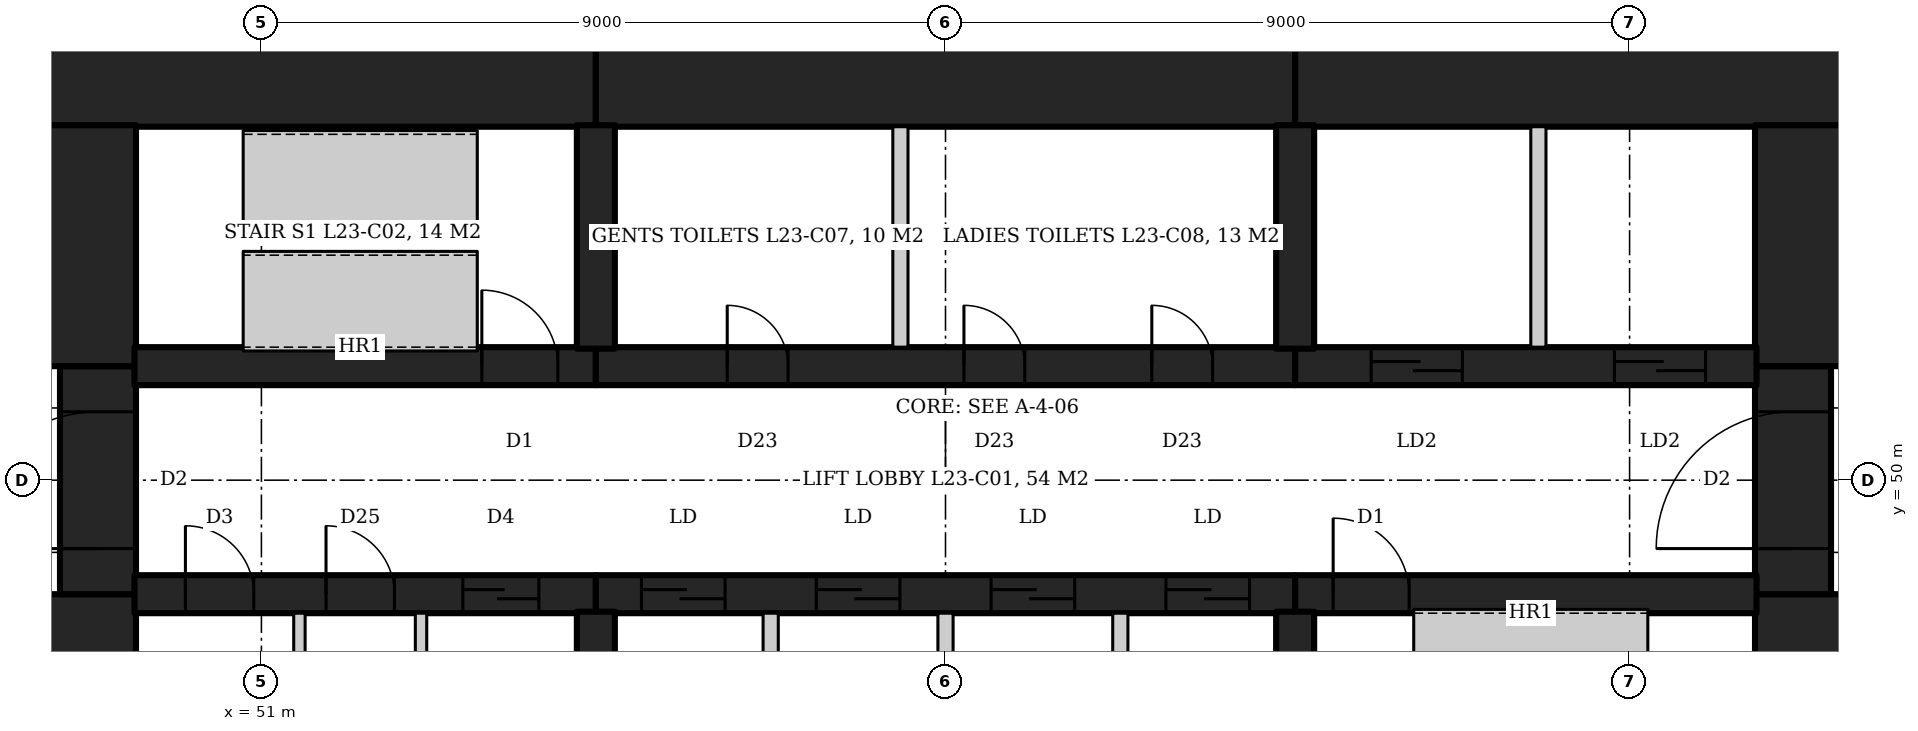
"""IFC4 building model, lengths in metres.
Left out: names, types, materials, properties, quantities, classifications, styles, units other than length and angle.
Written with IfcOpenShell. Run it as: python <this file> out.ifc"""

import sys

from ifc_helpers import new_model, si_unit, direction, frame, frame_2d, origin, place, context, subcontext, project, spatial, rectangle, extrude, element, fill, save


model = new_model("IFC4")
c1 = context("Model", 3, precision=1e-05, world=origin(), true_north=direction((0.0, 1.0)))
c2 = subcontext(c1, "Body", "Model", "MODEL_VIEW")
j1 = project(units=[si_unit("LENGTHUNIT", "METRE"), si_unit("PLANEANGLEUNIT", "RADIAN")], contexts=[c1])
p1 = place(None, origin())
s1 = spatial("IfcSite", under=j1, at=p1, CompositionType="ELEMENT")
p2 = place(p1, origin())
s2 = spatial("IfcBuilding", under=s1, at=p2, CompositionType="ELEMENT")
p3 = place(p2, frame((0.0, 0.0, 105.8)))
s3 = spatial("IfcBuildingStorey", under=s2, at=p3, CompositionType="ELEMENT", Elevation=105.8)
p4 = place(p3, frame((47.55, 55.55, 0.0), z_axis=(0.0, 0.0, 1.0), x_axis=(1.0, 0.0, 0.0)))
e1 = element("IfcWall", 1, at=p4, inside=s3, PredefinedType="SHEAR", context=c2, shape_type="SweptSolid", body=[
    extrude(rectangle(XDim=7.85, YDim=1.8, at=frame_2d((3.925, 0.0))), origin(), (0.0, 0.0, 1.0), 4.2),
])
p5 = place(p3, frame((55.4, 55.55, 0.0), z_axis=(0.0, 0.0, 1.0), x_axis=(1.0, 0.0, 0.0)))
e2 = element("IfcWall", 2, at=p5, inside=s3, PredefinedType="SHEAR", context=c2, shape_type="SweptSolid", body=[
    extrude(rectangle(XDim=9.2, YDim=1.8, at=frame_2d((4.6, 0.0))), origin(), (0.0, 0.0, 1.0), 4.2),
])
p6 = place(p3, frame((64.6, 55.55, 0.0), z_axis=(0.0, 0.0, 1.0), x_axis=(1.0, 0.0, 0.0)))
e3 = element("IfcWall", 3, at=p6, inside=s3, PredefinedType="SHEAR", context=c2, shape_type="SweptSolid", body=[
    extrude(rectangle(XDim=7.85, YDim=1.8, at=frame_2d((3.925, 0.0))), origin(), (0.0, 0.0, 1.0), 4.2),
])
p7 = place(p3, frame((71.55, 45.33, 0.0), z_axis=(0.0, 0.0, 1.0), x_axis=(0.0, 1.0, 0.0)))
e4 = element("IfcWall", 4, at=p7, inside=s3, PredefinedType="SHEAR", context=c2, shape_type="SweptSolid", body=[
    extrude(rectangle(XDim=3.17, YDim=1.8, at=frame_2d((1.585, 0.0))), origin(), (0.0, 0.0, 1.0), 4.2),
])
p8 = place(p3, frame((71.15, 48.5, 0.0), z_axis=(0.0, 0.0, 1.0), x_axis=(0.0, 1.0, 0.0)))
e5 = element("IfcWall", 5, at=p8, inside=s3, PredefinedType="SHEAR", context=c2, shape_type="SweptSolid", body=[
    extrude(rectangle(XDim=3.0, YDim=1.0, at=frame_2d((1.5, 0.0))), origin(), (0.0, 0.0, 1.0), 4.2),
])
p9 = place(p8, frame((0.6, 0.0, 0.0)))
e6 = element("IfcOpeningElement", 6, at=p9, cuts=e5, PredefinedType="OPENING", context=c2, shape_type="SweptSolid", body=[
    extrude(rectangle(XDim=1.8, YDim=2.1, at=frame_2d((0.9, 1.05))), frame((0.0, 0.51, 0.0), z_axis=(0.0, -1.0, 0.0), x_axis=(1.0, 0.0, 0.0)), (0.0, 0.0, 1.0), 1.02),
])
for number, where, z_axis, x_axis in (
    (7, (71.55, 51.5, 0.0), (0.0, 0.0, 1.0), (0.0, 1.0, 0.0)),
    (8, (48.45, 45.33, 0.0), (0.0, 0.0, 1.0), (0.0, 1.0, 0.0)),
):
    element("IfcWall", number, at=place(p3, frame(where, z_axis=z_axis, x_axis=x_axis)), inside=s3, PredefinedType="SHEAR", context=c2, shape_type="SweptSolid", body=[
        extrude(rectangle(XDim=3.17, YDim=1.8, at=frame_2d((1.585, 0.0))), origin(), (0.0, 0.0, 1.0), 4.2),
    ])
p10 = place(p3, frame((48.85, 48.5, 0.0), z_axis=(0.0, 0.0, 1.0), x_axis=(0.0, 1.0, 0.0)))
e9 = element("IfcWall", 9, at=p10, inside=s3, PredefinedType="SHEAR", context=c2, shape_type="SweptSolid", body=[
    extrude(rectangle(XDim=3.0, YDim=1.0, at=frame_2d((1.5, 0.0))), origin(), (0.0, 0.0, 1.0), 4.2),
])
p11 = place(p10, frame((0.6, 0.0, 0.0)))
e10 = element("IfcOpeningElement", 10, at=p11, cuts=e9, PredefinedType="OPENING", context=c2, shape_type="SweptSolid", body=[
    extrude(rectangle(XDim=1.8, YDim=2.1, at=frame_2d((0.9, 1.05))), frame((0.0, 0.51, 0.0), z_axis=(0.0, -1.0, 0.0), x_axis=(1.0, 0.0, 0.0)), (0.0, 0.0, 1.0), 1.02),
])
p12 = place(p3, frame((48.45, 51.5, 0.0), z_axis=(0.0, 0.0, 1.0), x_axis=(0.0, 1.0, 0.0)))
e11 = element("IfcWall", 11, at=p12, inside=s3, PredefinedType="SHEAR", context=c2, shape_type="SweptSolid", body=[
    extrude(rectangle(XDim=3.17, YDim=1.8, at=frame_2d((1.585, 0.0))), origin(), (0.0, 0.0, 1.0), 4.2),
])
p13 = place(p3, frame((49.33, 51.5, 0.0), z_axis=(0.0, 0.0, 1.0), x_axis=(1.0, 0.0, 0.0)))
e12 = element("IfcWall", 12, at=p13, inside=s3, PredefinedType="SHEAR", context=c2, shape_type="SweptSolid", body=[
    extrude(rectangle(XDim=6.07, YDim=0.5, at=frame_2d((3.035, 0.0))), origin(), (0.0, 0.0, 1.0), 4.2),
])
p14 = place(p13, frame((4.57, 0.0, 0.0)))
e13 = element("IfcOpeningElement", 13, at=p14, cuts=e12, PredefinedType="OPENING", context=c2, shape_type="SweptSolid", body=[
    extrude(rectangle(XDim=1.0, YDim=2.1, at=frame_2d((0.5, 1.05))), frame((0.0, 0.26, 0.0), z_axis=(0.0, -1.0, 0.0), x_axis=(1.0, 0.0, 0.0)), (0.0, 0.0, 1.0), 0.52),
])
p15 = place(p3, frame((55.4, 51.5, 0.0), z_axis=(0.0, 0.0, 1.0), x_axis=(1.0, 0.0, 0.0)))
e14 = element("IfcWall", 14, at=p15, inside=s3, PredefinedType="SHEAR", context=c2, shape_type="SweptSolid", body=[
    extrude(rectangle(XDim=9.2, YDim=0.5, at=frame_2d((4.6, 0.0))), origin(), (0.0, 0.0, 1.0), 4.2),
])
p16 = place(p15, frame((1.729, 0.0, 0.0)))
e15 = element("IfcOpeningElement", 15, at=p16, cuts=e14, PredefinedType="OPENING", context=c2, shape_type="SweptSolid", body=[
    extrude(rectangle(XDim=0.8, YDim=2.1, at=frame_2d((0.4, 1.05))), frame((0.0, 0.26, 0.0), z_axis=(0.0, -1.0, 0.0), x_axis=(1.0, 0.0, 0.0)), (0.0, 0.0, 1.0), 0.52),
])
p17 = place(p15, frame((4.843, 0.0, 0.0)))
e16 = element("IfcOpeningElement", 16, at=p17, cuts=e14, PredefinedType="OPENING", context=c2, shape_type="SweptSolid", body=[
    extrude(rectangle(XDim=0.8, YDim=2.1, at=frame_2d((0.4, 1.05))), frame((0.0, 0.26, 0.0), z_axis=(0.0, -1.0, 0.0), x_axis=(1.0, 0.0, 0.0)), (0.0, 0.0, 1.0), 0.52),
])
p18 = place(p15, frame((7.314, 0.0, 0.0)))
e17 = element("IfcOpeningElement", 17, at=p18, cuts=e14, PredefinedType="OPENING", context=c2, shape_type="SweptSolid", body=[
    extrude(rectangle(XDim=0.8, YDim=2.1, at=frame_2d((0.4, 1.05))), frame((0.0, 0.26, 0.0), z_axis=(0.0, -1.0, 0.0), x_axis=(1.0, 0.0, 0.0)), (0.0, 0.0, 1.0), 0.52),
])
p19 = place(p3, frame((64.6, 51.5, 0.0), z_axis=(0.0, 0.0, 1.0), x_axis=(1.0, 0.0, 0.0)))
e18 = element("IfcWall", 18, at=p19, inside=s3, PredefinedType="SHEAR", context=c2, shape_type="SweptSolid", body=[
    extrude(rectangle(XDim=6.07, YDim=0.5, at=frame_2d((3.035, 0.0))), origin(), (0.0, 0.0, 1.0), 4.2),
])
p20 = place(p19, frame((1.0, 0.0, 0.0)))
e19 = element("IfcOpeningElement", 19, at=p20, cuts=e18, PredefinedType="OPENING", context=c2, shape_type="SweptSolid", body=[
    extrude(rectangle(XDim=1.2, YDim=2.1, at=frame_2d((0.6, 1.05))), frame((0.0, 0.26, 0.0), z_axis=(0.0, -1.0, 0.0), x_axis=(1.0, 0.0, 0.0)), (0.0, 0.0, 1.0), 0.52),
])
p21 = place(p19, frame((4.2, 0.0, 0.0)))
e20 = element("IfcOpeningElement", 20, at=p21, cuts=e18, PredefinedType="OPENING", context=c2, shape_type="SweptSolid", body=[
    extrude(rectangle(XDim=1.2, YDim=2.1, at=frame_2d((0.6, 1.05))), frame((0.0, 0.26, 0.0), z_axis=(0.0, -1.0, 0.0), x_axis=(1.0, 0.0, 0.0)), (0.0, 0.0, 1.0), 0.52),
])
p22 = place(p3, frame((49.33, 48.5, 0.0), z_axis=(0.0, 0.0, 1.0), x_axis=(1.0, 0.0, 0.0)))
e21 = element("IfcWall", 21, at=p22, inside=s3, PredefinedType="SHEAR", context=c2, shape_type="SweptSolid", body=[
    extrude(rectangle(XDim=6.07, YDim=0.5, at=frame_2d((3.035, 0.0))), origin(), (0.0, 0.0, 1.0), 4.2),
])
p23 = place(p22, frame((0.67, 0.0, 0.0)))
e22 = element("IfcOpeningElement", 22, at=p23, cuts=e21, PredefinedType="OPENING", context=c2, shape_type="SweptSolid", body=[
    extrude(rectangle(XDim=0.9, YDim=2.1, at=frame_2d((0.45, 1.05))), frame((0.0, 0.26, 0.0), z_axis=(0.0, -1.0, 0.0), x_axis=(1.0, 0.0, 0.0)), (0.0, 0.0, 1.0), 0.52),
])
p24 = place(p22, frame((2.52, 0.0, 0.0)))
e23 = element("IfcOpeningElement", 23, at=p24, cuts=e21, PredefinedType="OPENING", context=c2, shape_type="SweptSolid", body=[
    extrude(rectangle(XDim=0.9, YDim=2.1, at=frame_2d((0.45, 1.05))), frame((0.0, 0.26, 0.0), z_axis=(0.0, -1.0, 0.0), x_axis=(1.0, 0.0, 0.0)), (0.0, 0.0, 1.0), 0.52),
])
p25 = place(p22, frame((4.32, 0.0, 0.0)))
e24 = element("IfcOpeningElement", 24, at=p25, cuts=e21, PredefinedType="OPENING", context=c2, shape_type="SweptSolid", body=[
    extrude(rectangle(XDim=1.0, YDim=2.1, at=frame_2d((0.5, 1.05))), frame((0.0, 0.26, 0.0), z_axis=(0.0, -1.0, 0.0), x_axis=(1.0, 0.0, 0.0)), (0.0, 0.0, 1.0), 0.52),
])
p26 = place(p3, frame((55.4, 48.5, 0.0), z_axis=(0.0, 0.0, 1.0), x_axis=(1.0, 0.0, 0.0)))
e25 = element("IfcWall", 25, at=p26, inside=s3, PredefinedType="SHEAR", context=c2, shape_type="SweptSolid", body=[
    extrude(rectangle(XDim=9.2, YDim=0.5, at=frame_2d((4.6, 0.0))), origin(), (0.0, 0.0, 1.0), 4.2),
])
p27 = place(p26, frame((0.6, 0.0, 0.0)))
e26 = element("IfcOpeningElement", 26, at=p27, cuts=e25, PredefinedType="OPENING", context=c2, shape_type="SweptSolid", body=[
    extrude(rectangle(XDim=1.1, YDim=2.1, at=frame_2d((0.55, 1.05))), frame((0.0, 0.26, 0.0), z_axis=(0.0, -1.0, 0.0), x_axis=(1.0, 0.0, 0.0)), (0.0, 0.0, 1.0), 0.52),
])
p28 = place(p26, frame((2.9, 0.0, 0.0)))
e27 = element("IfcOpeningElement", 27, at=p28, cuts=e25, PredefinedType="OPENING", context=c2, shape_type="SweptSolid", body=[
    extrude(rectangle(XDim=1.1, YDim=2.1, at=frame_2d((0.55, 1.05))), frame((0.0, 0.26, 0.0), z_axis=(0.0, -1.0, 0.0), x_axis=(1.0, 0.0, 0.0)), (0.0, 0.0, 1.0), 0.52),
])
p29 = place(p26, frame((5.2, 0.0, 0.0)))
e28 = element("IfcOpeningElement", 28, at=p29, cuts=e25, PredefinedType="OPENING", context=c2, shape_type="SweptSolid", body=[
    extrude(rectangle(XDim=1.1, YDim=2.1, at=frame_2d((0.55, 1.05))), frame((0.0, 0.26, 0.0), z_axis=(0.0, -1.0, 0.0), x_axis=(1.0, 0.0, 0.0)), (0.0, 0.0, 1.0), 0.52),
])
p30 = place(p26, frame((7.5, 0.0, 0.0)))
e29 = element("IfcOpeningElement", 29, at=p30, cuts=e25, PredefinedType="OPENING", context=c2, shape_type="SweptSolid", body=[
    extrude(rectangle(XDim=1.1, YDim=2.1, at=frame_2d((0.55, 1.05))), frame((0.0, 0.26, 0.0), z_axis=(0.0, -1.0, 0.0), x_axis=(1.0, 0.0, 0.0)), (0.0, 0.0, 1.0), 0.52),
])
p31 = place(p3, frame((64.6, 48.5, 0.0), z_axis=(0.0, 0.0, 1.0), x_axis=(1.0, 0.0, 0.0)))
e30 = element("IfcWall", 30, at=p31, inside=s3, PredefinedType="SHEAR", context=c2, shape_type="SweptSolid", body=[
    extrude(rectangle(XDim=6.07, YDim=0.5, at=frame_2d((3.035, 0.0))), origin(), (0.0, 0.0, 1.0), 4.2),
])
p32 = place(p31, frame((0.5, 0.0, 0.0)))
e31 = element("IfcOpeningElement", 31, at=p32, cuts=e30, PredefinedType="OPENING", context=c2, shape_type="SweptSolid", body=[
    extrude(rectangle(XDim=1.0, YDim=2.1, at=frame_2d((0.5, 1.05))), frame((0.0, 0.26, 0.0), z_axis=(0.0, -1.0, 0.0), x_axis=(1.0, 0.0, 0.0)), (0.0, 0.0, 1.0), 0.52),
])
for number, where, z_axis, x_axis in (
    (32, (55.4, 51.73, 0.0), (0.0, 0.0, 1.0), (0.0, 1.0, 0.0)),
    (33, (64.6, 51.73, 0.0), (0.0, 0.0, 1.0), (0.0, 1.0, 0.0)),
    (34, (55.4, 48.27, 0.0), (0.0, 0.0, 1.0), (0.0, -1.0, 0.0)),
    (35, (64.6, 48.27, 0.0), (0.0, 0.0, 1.0), (0.0, -1.0, 0.0)),
):
    element("IfcWall", number, at=place(p3, frame(where, z_axis=z_axis, x_axis=x_axis)), inside=s3, PredefinedType="SHEAR", context=c2, shape_type="SweptSolid", body=[
        extrude(rectangle(XDim=2.94, YDim=0.5, at=frame_2d((1.47, 0.0))), origin(), (0.0, 0.0, 1.0), 4.2),
    ])
for number, where, z_axis, x_axis in (
    (36, (57.7, 45.35, 0.0), (0.0, 0.0, 1.0), (0.0, 1.0, 0.0)),
    (37, (60.0, 45.35, 0.0), (0.0, 0.0, 1.0), (0.0, 1.0, 0.0)),
    (38, (62.3, 45.35, 0.0), (0.0, 0.0, 1.0), (0.0, 1.0, 0.0)),
    (39, (67.8, 51.75, 0.0), (0.0, 0.0, 1.0), (0.0, 1.0, 0.0)),
):
    element("IfcWall", number, at=place(p3, frame(where, z_axis=z_axis, x_axis=x_axis)), inside=s3, PredefinedType="PARTITIONING", context=c2, shape_type="SweptSolid", body=[
        extrude(rectangle(XDim=2.9, YDim=0.2, at=frame_2d((1.45, 0.0))), origin(), (0.0, 0.0, 1.0), 4.2),
    ])
for number, where, z_axis, x_axis in (
    (40, (51.5, 45.35, 0.0), (0.0, 0.0, 1.0), (0.0, 1.0, 0.0)),
    (41, (53.1, 45.35, 0.0), (0.0, 0.0, 1.0), (0.0, 1.0, 0.0)),
):
    element("IfcWall", number, at=place(p3, frame(where, z_axis=z_axis, x_axis=x_axis)), inside=s3, PredefinedType="PARTITIONING", context=c2, shape_type="SweptSolid", body=[
        extrude(rectangle(XDim=2.9, YDim=0.15, at=frame_2d((1.45, 0.0))), origin(), (0.0, 0.0, 1.0), 4.04),
    ])
p33 = place(p3, frame((59.407, 51.75, 0.0), z_axis=(0.0, 0.0, 1.0), x_axis=(0.0, 1.0, 0.0)))
e42 = element("IfcWall", 42, at=p33, inside=s3, PredefinedType="PARTITIONING", context=c2, shape_type="SweptSolid", body=[
    extrude(rectangle(XDim=2.9, YDim=0.2, at=frame_2d((1.45, 0.0))), origin(), (0.0, 0.0, 1.0), 4.04),
])
p34 = place(p14, origin())
e43 = element("IfcDoor", 43, at=p34, inside=s3, OperationType="SINGLE_SWING_LEFT", PredefinedType="DOOR", context=c2, shape_type="SweptSolid", body=[
    extrude(rectangle(XDim=1.0, YDim=2.1, at=frame_2d((0.5, 1.05))), frame((0.0, 0.025, 0.0), z_axis=(0.0, -1.0, 0.0), x_axis=(1.0, 0.0, 0.0)), (0.0, 0.0, 1.0), 0.05),
])
fill(e13, e43)
p35 = place(p32, origin())
e44 = element("IfcDoor", 44, at=p35, inside=s3, OperationType="SINGLE_SWING_LEFT", PredefinedType="DOOR", context=c2, shape_type="SweptSolid", body=[
    extrude(rectangle(XDim=1.0, YDim=2.1, at=frame_2d((0.5, 1.05))), frame((0.0, 0.025, 0.0), z_axis=(0.0, -1.0, 0.0), x_axis=(1.0, 0.0, 0.0)), (0.0, 0.0, 1.0), 0.05),
])
fill(e31, e44)
p36 = place(p20, origin())
e45 = element("IfcDoor", 45, at=p36, inside=s3, OperationType="SLIDING_TO_LEFT", PredefinedType="DOOR", context=c2, shape_type="SweptSolid", body=[
    extrude(rectangle(XDim=1.2, YDim=2.1, at=frame_2d((0.6, 1.05))), frame((0.0, 0.025, 0.0), z_axis=(0.0, -1.0, 0.0), x_axis=(1.0, 0.0, 0.0)), (0.0, 0.0, 1.0), 0.05),
])
fill(e19, e45)
p37 = place(p21, origin())
e46 = element("IfcDoor", 46, at=p37, inside=s3, OperationType="SLIDING_TO_LEFT", PredefinedType="DOOR", context=c2, shape_type="SweptSolid", body=[
    extrude(rectangle(XDim=1.2, YDim=2.1, at=frame_2d((0.6, 1.05))), frame((0.0, 0.025, 0.0), z_axis=(0.0, -1.0, 0.0), x_axis=(1.0, 0.0, 0.0)), (0.0, 0.0, 1.0), 0.05),
])
fill(e20, e46)
p38 = place(p27, origin())
e47 = element("IfcDoor", 47, at=p38, inside=s3, OperationType="SLIDING_TO_LEFT", PredefinedType="DOOR", context=c2, shape_type="SweptSolid", body=[
    extrude(rectangle(XDim=1.1, YDim=2.1, at=frame_2d((0.55, 1.05))), frame((0.0, 0.025, 0.0), z_axis=(0.0, -1.0, 0.0), x_axis=(1.0, 0.0, 0.0)), (0.0, 0.0, 1.0), 0.05),
])
fill(e26, e47)
p39 = place(p28, origin())
e48 = element("IfcDoor", 48, at=p39, inside=s3, OperationType="SLIDING_TO_LEFT", PredefinedType="DOOR", context=c2, shape_type="SweptSolid", body=[
    extrude(rectangle(XDim=1.1, YDim=2.1, at=frame_2d((0.55, 1.05))), frame((0.0, 0.025, 0.0), z_axis=(0.0, -1.0, 0.0), x_axis=(1.0, 0.0, 0.0)), (0.0, 0.0, 1.0), 0.05),
])
fill(e27, e48)
p40 = place(p29, origin())
e49 = element("IfcDoor", 49, at=p40, inside=s3, OperationType="SLIDING_TO_LEFT", PredefinedType="DOOR", context=c2, shape_type="SweptSolid", body=[
    extrude(rectangle(XDim=1.1, YDim=2.1, at=frame_2d((0.55, 1.05))), frame((0.0, 0.025, 0.0), z_axis=(0.0, -1.0, 0.0), x_axis=(1.0, 0.0, 0.0)), (0.0, 0.0, 1.0), 0.05),
])
fill(e28, e49)
p41 = place(p30, origin())
e50 = element("IfcDoor", 50, at=p41, inside=s3, OperationType="SLIDING_TO_LEFT", PredefinedType="DOOR", context=c2, shape_type="SweptSolid", body=[
    extrude(rectangle(XDim=1.1, YDim=2.1, at=frame_2d((0.55, 1.05))), frame((0.0, 0.025, 0.0), z_axis=(0.0, -1.0, 0.0), x_axis=(1.0, 0.0, 0.0)), (0.0, 0.0, 1.0), 0.05),
])
fill(e29, e50)
p42 = place(p23, origin())
e51 = element("IfcDoor", 51, at=p42, inside=s3, OperationType="SINGLE_SWING_RIGHT", PredefinedType="DOOR", context=c2, shape_type="SweptSolid", body=[
    extrude(rectangle(XDim=0.9, YDim=2.1, at=frame_2d((0.45, 1.05))), frame((0.0, 0.025, 0.0), z_axis=(0.0, -1.0, 0.0), x_axis=(1.0, 0.0, 0.0)), (0.0, 0.0, 1.0), 0.05),
])
fill(e22, e51)
p43 = place(p24, origin())
e52 = element("IfcDoor", 52, at=p43, inside=s3, OperationType="SINGLE_SWING_RIGHT", PredefinedType="DOOR", context=c2, shape_type="SweptSolid", body=[
    extrude(rectangle(XDim=0.9, YDim=2.1, at=frame_2d((0.45, 1.05))), frame((0.0, 0.025, 0.0), z_axis=(0.0, -1.0, 0.0), x_axis=(1.0, 0.0, 0.0)), (0.0, 0.0, 1.0), 0.05),
])
fill(e23, e52)
p44 = place(p25, origin())
e53 = element("IfcDoor", 53, at=p44, inside=s3, OperationType="SLIDING_TO_LEFT", PredefinedType="DOOR", context=c2, shape_type="SweptSolid", body=[
    extrude(rectangle(XDim=1.0, YDim=2.1, at=frame_2d((0.5, 1.05))), frame((0.0, 0.025, 0.0), z_axis=(0.0, -1.0, 0.0), x_axis=(1.0, 0.0, 0.0)), (0.0, 0.0, 1.0), 0.05),
])
fill(e24, e53)
p45 = place(p9, origin())
e54 = element("IfcDoor", 54, at=p45, inside=s3, OperationType="DOUBLE_DOOR_DOUBLE_SWING", PredefinedType="DOOR", context=c2, shape_type="SweptSolid", body=[
    extrude(rectangle(XDim=1.8, YDim=2.1, at=frame_2d((0.9, 1.05))), frame((0.0, 0.025, 0.0), z_axis=(0.0, -1.0, 0.0), x_axis=(1.0, 0.0, 0.0)), (0.0, 0.0, 1.0), 0.05),
])
fill(e6, e54)
p46 = place(p11, origin())
e55 = element("IfcDoor", 55, at=p46, inside=s3, OperationType="DOUBLE_DOOR_DOUBLE_SWING", PredefinedType="DOOR", context=c2, shape_type="SweptSolid", body=[
    extrude(rectangle(XDim=1.8, YDim=2.1, at=frame_2d((0.9, 1.05))), frame((0.0, 0.025, 0.0), z_axis=(0.0, -1.0, 0.0), x_axis=(1.0, 0.0, 0.0)), (0.0, 0.0, 1.0), 0.05),
])
fill(e10, e55)
p47 = place(p16, origin())
e56 = element("IfcDoor", 56, at=p47, inside=s3, OperationType="SINGLE_SWING_LEFT", PredefinedType="DOOR", context=c2, shape_type="SweptSolid", body=[
    extrude(rectangle(XDim=0.8, YDim=2.1, at=frame_2d((0.4, 1.05))), frame((0.0, 0.025, 0.0), z_axis=(0.0, -1.0, 0.0), x_axis=(1.0, 0.0, 0.0)), (0.0, 0.0, 1.0), 0.05),
])
fill(e15, e56)
p48 = place(p17, origin())
e57 = element("IfcDoor", 57, at=p48, inside=s3, OperationType="SINGLE_SWING_LEFT", PredefinedType="DOOR", context=c2, shape_type="SweptSolid", body=[
    extrude(rectangle(XDim=0.8, YDim=2.1, at=frame_2d((0.4, 1.05))), frame((0.0, 0.025, 0.0), z_axis=(0.0, -1.0, 0.0), x_axis=(1.0, 0.0, 0.0)), (0.0, 0.0, 1.0), 0.05),
])
fill(e16, e57)
p49 = place(p18, origin())
e58 = element("IfcDoor", 58, at=p49, inside=s3, OperationType="SINGLE_SWING_LEFT", PredefinedType="DOOR", context=c2, shape_type="SweptSolid", body=[
    extrude(rectangle(XDim=0.8, YDim=2.1, at=frame_2d((0.4, 1.05))), frame((0.0, 0.025, 0.0), z_axis=(0.0, -1.0, 0.0), x_axis=(1.0, 0.0, 0.0)), (0.0, 0.0, 1.0), 0.05),
])
fill(e17, e58)
save(model, sys.argv[1])
